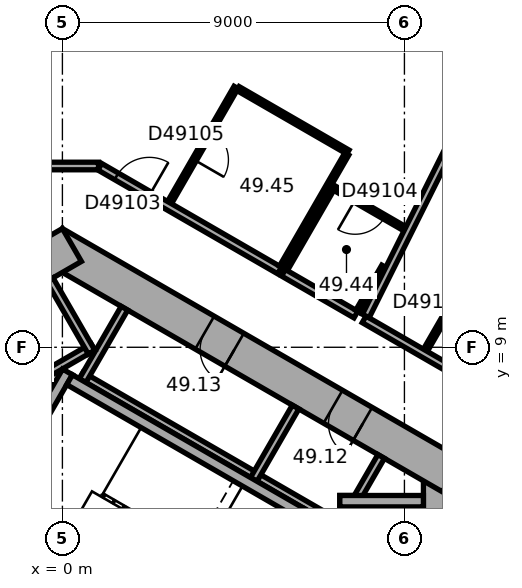
"""IFC4 building model, lengths in metres.
Left out: names, types, materials, properties, quantities, classifications, styles, units other than length and angle.
Written with IfcOpenShell. Run it as: python <this file> out.ifc"""

import sys

from ifc_helpers import new_model, si_unit, direction, frame, frame_2d, origin, place, context, subcontext, project, spatial, rectangle, extrude, element, fill, save


model = new_model("IFC4")
c1 = context("Model", 3, precision=1e-05, world=origin(), true_north=direction((0.0, 1.0)))
c2 = subcontext(c1, "Body", "Model", "MODEL_VIEW")
j1 = project(units=[si_unit("LENGTHUNIT", "METRE"), si_unit("PLANEANGLEUNIT", "RADIAN")], contexts=[c1])
p1 = place(None, origin())
s1 = spatial("IfcSite", under=j1, at=p1, CompositionType="ELEMENT")
p2 = place(p1, origin())
s2 = spatial("IfcBuilding", under=s1, at=p2, CompositionType="ELEMENT")
p3 = place(p2, frame((0.0, 0.0, 198.4)))
s3 = spatial("IfcBuildingStorey", under=s2, at=p3, CompositionType="ELEMENT", Elevation=198.4)
p4 = place(p3, frame((10.0, -6.062, 0.0), z_axis=(0.0, 0.0, 1.0), x_axis=(0.0, 1.0, 0.0)))
e1 = element("IfcWall", 1, at=p4, inside=s3, PredefinedType="SHEAR", context=c2, shape_type="SweptSolid", body=[
    extrude(rectangle(XDim=12.125, YDim=1.0, at=frame_2d((6.062, 0.0))), origin(), (0.0, 0.0, 1.0), 3.7),
])
p5 = place(p4, frame((6.262, 0.0, 0.0)))
e2 = element("IfcOpeningElement", 2, at=p5, cuts=e1, PredefinedType="OPENING", context=c2, shape_type="SweptSolid", body=[
    extrude(rectangle(XDim=1.5, YDim=2.1, at=frame_2d((0.75, 1.05))), frame((0.0, 0.51, 0.0), z_axis=(0.0, -1.0, 0.0), x_axis=(1.0, 0.0, 0.0)), (0.0, 0.0, 1.0), 1.02),
])
p6 = place(p4, frame((1.812, 0.0, 0.0)))
e3 = element("IfcOpeningElement", 3, at=p6, cuts=e1, PredefinedType="OPENING", context=c2, shape_type="SweptSolid", body=[
    extrude(rectangle(XDim=0.9, YDim=2.1, at=frame_2d((0.45, 1.05))), frame((0.0, 0.51, 0.0), z_axis=(0.0, -1.0, 0.0), x_axis=(1.0, 0.0, 0.0)), (0.0, 0.0, 1.0), 1.02),
])
p7 = place(p4, frame((4.412, 0.0, 0.0)))
e4 = element("IfcOpeningElement", 4, at=p7, cuts=e1, PredefinedType="OPENING", context=c2, shape_type="SweptSolid", body=[
    extrude(rectangle(XDim=0.9, YDim=2.1, at=frame_2d((0.45, 1.05))), frame((0.0, 0.51, 0.0), z_axis=(0.0, -1.0, 0.0), x_axis=(1.0, 0.0, 0.0)), (0.0, 0.0, 1.0), 1.02),
])
p8 = place(p3, frame((10.25, 5.629, 0.0), z_axis=(0.0, 0.0, 1.0), x_axis=(-0.866022616891, 0.50000482701, 0.0)))
e5 = element("IfcWall", 5, at=p8, inside=s3, PredefinedType="SHEAR", context=c2, shape_type="SweptSolid", body=[
    extrude(rectangle(XDim=12.125, YDim=1.0, at=frame_2d((6.062, 0.0))), origin(), (0.0, 0.0, 1.0), 3.7),
])
p9 = place(p8, frame((2.712, 0.0, 0.0)))
e6 = element("IfcOpeningElement", 6, at=p9, cuts=e5, PredefinedType="OPENING", context=c2, shape_type="SweptSolid", body=[
    extrude(rectangle(XDim=0.9, YDim=2.1, at=frame_2d((0.45, 1.05))), frame((0.0, 0.51, 0.0), z_axis=(0.0, -1.0, 0.0), x_axis=(1.0, 0.0, 0.0)), (0.0, 0.0, 1.0), 1.02),
])
p10 = place(p8, frame((6.612, 0.0, 0.0)))
e7 = element("IfcOpeningElement", 7, at=p10, cuts=e5, PredefinedType="OPENING", context=c2, shape_type="SweptSolid", body=[
    extrude(rectangle(XDim=0.9, YDim=2.1, at=frame_2d((0.45, 1.05))), frame((0.0, 0.51, 0.0), z_axis=(0.0, -1.0, 0.0), x_axis=(1.0, 0.0, 0.0)), (0.0, 0.0, 1.0), 1.02),
])
p11 = place(p3, frame((0.25, 11.691, 0.0), z_axis=(0.0, 0.0, 1.0), x_axis=(-0.866022616891, -0.50000482701, 0.0)))
e8 = element("IfcWall", 8, at=p11, inside=s3, PredefinedType="SHEAR", context=c2, shape_type="SweptSolid", body=[
    extrude(rectangle(XDim=12.125, YDim=1.0, at=frame_2d((6.062, 0.0))), origin(), (0.0, 0.0, 1.0), 3.7),
])
p12 = place(p11, frame((6.262, 0.0, 0.0)))
e9 = element("IfcOpeningElement", 9, at=p12, cuts=e8, PredefinedType="OPENING", context=c2, shape_type="SweptSolid", body=[
    extrude(rectangle(XDim=1.5, YDim=2.1, at=frame_2d((0.75, 1.05))), frame((0.0, 0.51, 0.0), z_axis=(0.0, -1.0, 0.0), x_axis=(1.0, 0.0, 0.0)), (0.0, 0.0, 1.0), 1.02),
])
p13 = place(p11, frame((1.812, 0.0, 0.0)))
e10 = element("IfcOpeningElement", 10, at=p13, cuts=e8, PredefinedType="OPENING", context=c2, shape_type="SweptSolid", body=[
    extrude(rectangle(XDim=0.9, YDim=2.1, at=frame_2d((0.45, 1.05))), frame((0.0, 0.51, 0.0), z_axis=(0.0, -1.0, 0.0), x_axis=(1.0, 0.0, 0.0)), (0.0, 0.0, 1.0), 1.02),
])
p14 = place(p11, frame((4.412, 0.0, 0.0)))
e11 = element("IfcOpeningElement", 11, at=p14, cuts=e8, PredefinedType="OPENING", context=c2, shape_type="SweptSolid", body=[
    extrude(rectangle(XDim=0.9, YDim=2.1, at=frame_2d((0.45, 1.05))), frame((0.0, 0.51, 0.0), z_axis=(0.0, -1.0, 0.0), x_axis=(1.0, 0.0, 0.0)), (0.0, 0.0, 1.0), 1.02),
])
p15 = place(p3, frame((19.464, 14.599, 0.0), z_axis=(0.0, 0.0, 1.0), x_axis=(-0.894935755043, 0.446195018289, 0.0)))
e12 = element("IfcWall", 12, at=p15, inside=s3, PredefinedType="STANDARD", context=c2, shape_type="SweptSolid", body=[
    extrude(rectangle(XDim=20.044, YDim=0.2, at=frame_2d((10.022, 0.0))), origin(), (0.0, 0.0, 1.0), 3.7),
])
p16 = place(p15, frame((1.313, 0.0, 0.9)))
e13 = element("IfcOpeningElement", 13, at=p16, cuts=e12, PredefinedType="OPENING", context=c2, shape_type="SweptSolid", body=[
    extrude(rectangle(XDim=2.4, YDim=2.0, at=frame_2d((1.2, 1.0))), frame((0.0, 0.11, 0.0), z_axis=(0.0, -1.0, 0.0), x_axis=(1.0, 0.0, 0.0)), (0.0, 0.0, 1.0), 0.22),
])
p17 = place(p15, frame((5.067, 0.0, 0.9)))
e14 = element("IfcOpeningElement", 14, at=p17, cuts=e12, PredefinedType="OPENING", context=c2, shape_type="SweptSolid", body=[
    extrude(rectangle(XDim=2.4, YDim=2.0, at=frame_2d((1.2, 1.0))), frame((0.0, 0.11, 0.0), z_axis=(0.0, -1.0, 0.0), x_axis=(1.0, 0.0, 0.0)), (0.0, 0.0, 1.0), 0.22),
])
p18 = place(p15, frame((8.821, 0.0, 0.9)))
e15 = element("IfcOpeningElement", 15, at=p18, cuts=e12, PredefinedType="OPENING", context=c2, shape_type="SweptSolid", body=[
    extrude(rectangle(XDim=2.4, YDim=2.0, at=frame_2d((1.2, 1.0))), frame((0.0, 0.11, 0.0), z_axis=(0.0, -1.0, 0.0), x_axis=(1.0, 0.0, 0.0)), (0.0, 0.0, 1.0), 0.22),
])
p19 = place(p15, frame((12.575, 0.0, 0.9)))
e16 = element("IfcOpeningElement", 16, at=p19, cuts=e12, PredefinedType="OPENING", context=c2, shape_type="SweptSolid", body=[
    extrude(rectangle(XDim=2.4, YDim=2.0, at=frame_2d((1.2, 1.0))), frame((0.0, 0.11, 0.0), z_axis=(0.0, -1.0, 0.0), x_axis=(1.0, 0.0, 0.0)), (0.0, 0.0, 1.0), 0.22),
])
p20 = place(p15, frame((16.329, 0.0, 0.9)))
e17 = element("IfcOpeningElement", 17, at=p20, cuts=e12, PredefinedType="OPENING", context=c2, shape_type="SweptSolid", body=[
    extrude(rectangle(XDim=2.4, YDim=2.0, at=frame_2d((1.2, 1.0))), frame((0.0, 0.11, 0.0), z_axis=(0.0, -1.0, 0.0), x_axis=(1.0, 0.0, 0.0)), (0.0, 0.0, 1.0), 0.22),
])
p21 = place(p3, frame((7.424, 4.259, 0.0), z_axis=(0.0, 0.0, 1.0), x_axis=(-0.866026010844, 0.49999894854, 0.0)))
e18 = element("IfcWall", 18, at=p21, inside=s3, PredefinedType="PARTITIONING", context=c2, shape_type="SweptSolid", body=[
    extrude(rectangle(XDim=8.0, YDim=0.2, at=frame_2d((4.0, 0.0))), origin(), (0.0, 0.0, 1.0), 3.42),
])
for number, where, z_axis, x_axis in (
    (19, (7.287, 4.222, 0.0), (0.0, 0.0, 1.0), (0.5, 0.866, 0.0)),
    (20, (5.036, 5.522, 0.0), (0.0, 0.0, 1.0), (0.5, 0.866, 0.0)),
    (21, (0.532, 8.122, 0.0), (0.0, 0.0, 1.0), (0.5, 0.866, 0.0)),
):
    element("IfcWall", number, at=place(p3, frame(where, z_axis=z_axis, x_axis=x_axis)), inside=s3, PredefinedType="PARTITIONING", context=c2, shape_type="SweptSolid", body=[
        extrude(rectangle(XDim=2.2, YDim=0.2, at=frame_2d((1.1, 0.0))), origin(), (0.0, 0.0, 1.0), 3.42),
    ])
p22 = place(p3, frame((0.803, 9.009, 0.0), z_axis=(0.0, 0.0, 1.0), x_axis=(-0.866028230842, -0.499995103361, 0.0)))
e22 = element("IfcWall", 22, at=p22, inside=s3, PredefinedType="PARTITIONING", context=c2, shape_type="SweptSolid", body=[
    extrude(rectangle(XDim=5.4, YDim=0.2, at=frame_2d((2.7, 0.0))), origin(), (0.0, 0.0, 1.0), 3.42),
])
p23 = place(p3, frame((0.767, 8.872, 0.0), z_axis=(0.0, 0.0, 1.0), x_axis=(-0.499994660107, 0.866028486751, 0.0)))
e23 = element("IfcWall", 23, at=p23, inside=s3, PredefinedType="PARTITIONING", context=c2, shape_type="SweptSolid", body=[
    extrude(rectangle(XDim=2.2, YDim=0.2, at=frame_2d((1.1, 0.0))), origin(), (0.0, 0.0, 1.0), 3.42),
])
p24 = place(p3, frame((4.158, 0.602, 0.0), z_axis=(0.0, 0.0, 1.0), x_axis=(0.499977259774, 0.866038532462, 0.0)))
e24 = element("IfcWall", 24, at=p24, inside=s3, PredefinedType="SHEAR", context=c2, shape_type="SweptSolid", body=[
    extrude(rectangle(XDim=4.7, YDim=0.3, at=frame_2d((2.35, 0.0))), origin(), (0.0, 0.0, 1.0), 3.42),
])
p25 = place(p24, frame((0.8, 0.0, 0.0)))
e25 = element("IfcOpeningElement", 25, at=p25, cuts=e24, PredefinedType="OPENING", context=c2, shape_type="SweptSolid", body=[
    extrude(rectangle(XDim=1.2, YDim=2.1, at=frame_2d((0.6, 1.05))), frame((0.0, 0.16, 0.0), z_axis=(0.0, -1.0, 0.0), x_axis=(1.0, 0.0, 0.0)), (0.0, 0.0, 1.0), 0.32),
])
p26 = place(p3, frame((-2.216, 4.282, 0.0), z_axis=(0.0, 0.0, 1.0), x_axis=(0.499977259774, 0.866038532462, 0.0)))
e26 = element("IfcWall", 26, at=p26, inside=s3, PredefinedType="SHEAR", context=c2, shape_type="SweptSolid", body=[
    extrude(rectangle(XDim=4.7, YDim=0.3, at=frame_2d((2.35, 0.0))), origin(), (0.0, 0.0, 1.0), 3.42),
])
p27 = place(p3, frame((6.303, 4.617, 0.0), z_axis=(0.0, 0.0, 1.0), x_axis=(-0.866027801685, 0.499995846692, 0.0)))
e27 = element("IfcWall", 27, at=p27, inside=s3, PredefinedType="SHEAR", context=c2, shape_type="SweptSolid", body=[
    extrude(rectangle(XDim=7.06, YDim=0.3, at=frame_2d((3.53, 0.0))), origin(), (0.0, 0.0, 1.0), 3.42),
])
p28 = place(p3, frame((7.45, 1.75, 0.0), z_axis=(0.0, 0.0, 1.0), x_axis=(0.0, 1.0, 0.0)))
e28 = element("IfcWall", 28, at=p28, inside=s3, PredefinedType="SHEAR", context=c2, shape_type="SweptSolid", body=[
    extrude(rectangle(XDim=3.35, YDim=0.3, at=frame_2d((1.675, 0.0))), origin(), (0.0, 0.0, 1.0), 3.42),
])
p29 = place(p3, frame((7.3, 4.95, 0.0), z_axis=(0.0, 0.0, 1.0), x_axis=(1.0, 0.0, 0.0)))
e29 = element("IfcWall", 29, at=p29, inside=s3, PredefinedType="SHEAR", context=c2, shape_type="SweptSolid", body=[
    extrude(rectangle(XDim=2.2, YDim=0.3, at=frame_2d((1.1, 0.0))), origin(), (0.0, 0.0, 1.0), 3.42),
])
p30 = place(p3, frame((0.95, 13.77, 0.0), z_axis=(0.0, 0.0, 1.0), x_axis=(-1.0, 0.0, 0.0)))
e30 = element("IfcWall", 30, at=p30, inside=s3, PredefinedType="PARTITIONING", context=c2, shape_type="SweptSolid", body=[
    extrude(rectangle(XDim=1.86, YDim=0.2, at=frame_2d((0.93, 0.0))), origin(), (0.0, 0.0, 1.0), 3.42),
])
p31 = place(p3, frame((2.819, 12.806, 0.0), z_axis=(0.0, 0.0, 1.0), x_axis=(0.500010275428, 0.866019471182, 0.0)))
e31 = element("IfcWall", 31, at=p31, inside=s3, PredefinedType="PARTITIONING", context=c2, shape_type="SweptSolid", body=[
    extrude(rectangle(XDim=3.5, YDim=0.12, at=frame_2d((1.75, 0.0))), origin(), (0.0, 0.0, 1.0), 3.42),
])
p32 = place(p31, frame((1.3, 0.0, 0.0)))
e32 = element("IfcOpeningElement", 32, at=p32, cuts=e31, PredefinedType="OPENING", context=c2, shape_type="SweptSolid", body=[
    extrude(rectangle(XDim=0.9, YDim=2.1, at=frame_2d((0.45, 1.05))), frame((0.0, 0.07, 0.0), z_axis=(0.0, -1.0, 0.0), x_axis=(1.0, 0.0, 0.0)), (0.0, 0.0, 1.0), 0.14),
])
p33 = place(p3, frame((4.621, 15.807, 0.0), z_axis=(0.0, 0.0, 1.0), x_axis=(0.866039519639, -0.499975549825, 0.0)))
e33 = element("IfcWall", 33, at=p33, inside=s3, PredefinedType="PARTITIONING", context=c2, shape_type="SweptSolid", body=[
    extrude(rectangle(XDim=3.34, YDim=0.12, at=frame_2d((1.67, 0.0))), origin(), (0.0, 0.0, 1.0), 3.42),
])
p34 = place(p3, frame((5.713, 11.02, 0.0), z_axis=(0.0, 0.0, 1.0), x_axis=(-0.866038905227, 0.499976614087, 0.0)))
e34 = element("IfcWall", 34, at=p34, inside=s3, PredefinedType="PARTITIONING", context=c2, shape_type="SweptSolid", body=[
    extrude(rectangle(XDim=5.46, YDim=0.2, at=frame_2d((2.73, 0.0))), origin(), (0.0, 0.0, 1.0), 3.42),
])
p35 = place(p34, frame((3.955, 0.0, 0.0)))
e35 = element("IfcOpeningElement", 35, at=p35, cuts=e34, PredefinedType="OPENING", context=c2, shape_type="SweptSolid", body=[
    extrude(rectangle(XDim=1.0, YDim=2.1, at=frame_2d((0.5, 1.05))), frame((0.0, 0.11, 0.0), z_axis=(0.0, -1.0, 0.0), x_axis=(1.0, 0.0, 0.0)), (0.0, 0.0, 1.0), 0.22),
])
p36 = place(p3, frame((5.867, 11.046, 0.0), z_axis=(0.0, 0.0, 1.0), x_axis=(0.500004234368, 0.866022959057, 0.0)))
e36 = element("IfcWall", 36, at=p36, inside=s3, PredefinedType="PARTITIONING", context=c2, shape_type="SweptSolid", body=[
    extrude(rectangle(XDim=2.5, YDim=0.12, at=frame_2d((1.25, 0.0))), origin(), (0.0, 0.0, 1.0), 3.42),
])
p37 = place(p3, frame((7.169, 13.181, 0.0), z_axis=(0.0, 0.0, 1.0), x_axis=(0.866048165231, -0.499960573946, 0.0)))
e37 = element("IfcWall", 37, at=p37, inside=s3, PredefinedType="PARTITIONING", context=c2, shape_type="SweptSolid", body=[
    extrude(rectangle(XDim=2.13, YDim=0.12, at=frame_2d((1.065, 0.0))), origin(), (0.0, 0.0, 1.0), 3.42),
])
p38 = place(p37, frame((0.615, 0.0, 0.0)))
e38 = element("IfcOpeningElement", 38, at=p38, cuts=e37, PredefinedType="OPENING", context=c2, shape_type="SweptSolid", body=[
    extrude(rectangle(XDim=0.9, YDim=2.1, at=frame_2d((0.45, 1.05))), frame((0.0, 0.07, 0.0), z_axis=(0.0, -1.0, 0.0), x_axis=(1.0, 0.0, 0.0)), (0.0, 0.0, 1.0), 0.14),
])
p39 = place(p3, frame((7.483, 14.085, 0.0), z_axis=(0.0, 0.0, 1.0), x_axis=(-0.499978425106, -0.866037859697, 0.0)))
e39 = element("IfcWall", 39, at=p39, inside=s3, PredefinedType="PARTITIONING", context=c2, shape_type="SweptSolid", body=[
    extrude(rectangle(XDim=3.44, YDim=0.12, at=frame_2d((1.72, 0.0))), origin(), (0.0, 0.0, 1.0), 3.42),
])
p40 = place(p3, frame((7.722, 9.86, 0.0), z_axis=(0.0, 0.0, 1.0), x_axis=(-0.86598042715, 0.500077893725, 0.0)))
e40 = element("IfcWall", 40, at=p40, inside=s3, PredefinedType="PARTITIONING", context=c2, shape_type="SweptSolid", body=[
    extrude(rectangle(XDim=2.2, YDim=0.2, at=frame_2d((1.1, 0.0))), origin(), (0.0, 0.0, 1.0), 3.42),
])
p41 = place(p3, frame((8.457, 11.132, 0.0), z_axis=(0.0, 0.0, 1.0), x_axis=(-0.500129009956, -0.865950907038, 0.0)))
e41 = element("IfcWall", 41, at=p41, inside=s3, PredefinedType="PARTITIONING", context=c2, shape_type="SweptSolid", body=[
    extrude(rectangle(XDim=1.369, YDim=0.12, at=frame_2d((0.685, 0.0))), origin(), (0.0, 0.0, 1.0), 3.42),
])
p42 = place(p3, frame((9.552, 8.919, 0.0), z_axis=(0.0, 0.0, 1.0), x_axis=(0.499952165731, 0.866053019151, 0.0)))
e42 = element("IfcWall", 42, at=p42, inside=s3, PredefinedType="PARTITIONING", context=c2, shape_type="SweptSolid", body=[
    extrude(rectangle(XDim=2.3, YDim=0.12, at=frame_2d((1.15, 0.0))), origin(), (0.0, 0.0, 1.0), 3.42),
])
p43 = place(p42, frame((0.7, 0.0, 0.0)))
e43 = element("IfcOpeningElement", 43, at=p43, cuts=e42, PredefinedType="OPENING", context=c2, shape_type="SweptSolid", body=[
    extrude(rectangle(XDim=0.9, YDim=2.1, at=frame_2d((0.45, 1.05))), frame((0.0, 0.07, 0.0), z_axis=(0.0, -1.0, 0.0), x_axis=(1.0, 0.0, 0.0)), (0.0, 0.0, 1.0), 0.14),
])
p44 = place(p3, frame((11.233, 7.833, 0.0), z_axis=(0.0, 0.0, 1.0), x_axis=(-0.866002813504, 0.500039125473, 0.0)))
e44 = element("IfcWall", 44, at=p44, inside=s3, PredefinedType="PARTITIONING", context=c2, shape_type="SweptSolid", body=[
    extrude(rectangle(XDim=3.804, YDim=0.2, at=frame_2d((1.902, 0.0))), origin(), (0.0, 0.0, 1.0), 3.42),
])
p45 = place(p3, frame((11.73, 17.338, 0.0), z_axis=(0.0, 0.0, 1.0), x_axis=(-0.446189718314, -0.894938397473, 0.0)))
e45 = element("IfcWall", 45, at=p45, inside=s3, PredefinedType="PARTITIONING", context=c2, shape_type="SweptSolid", body=[
    extrude(rectangle(XDim=8.396, YDim=0.2, at=frame_2d((4.198, 0.0))), origin(), (0.0, 0.0, 1.0), 2.87),
])
p46 = place(p9, origin())
e46 = element("IfcDoor", 46, at=p46, inside=s3, OperationType="SINGLE_SWING_LEFT", PredefinedType="DOOR", context=c2, shape_type="SweptSolid", body=[
    extrude(rectangle(XDim=0.9, YDim=2.1, at=frame_2d((0.45, 1.05))), frame((0.0, 0.025, 0.0), z_axis=(0.0, -1.0, 0.0), x_axis=(1.0, 0.0, 0.0)), (0.0, 0.0, 1.0), 0.05),
])
fill(e6, e46)
p47 = place(p10, origin())
e47 = element("IfcDoor", 47, at=p47, inside=s3, OperationType="SINGLE_SWING_LEFT", PredefinedType="DOOR", context=c2, shape_type="SweptSolid", body=[
    extrude(rectangle(XDim=0.9, YDim=2.1, at=frame_2d((0.45, 1.05))), frame((0.0, 0.025, 0.0), z_axis=(0.0, -1.0, 0.0), x_axis=(1.0, 0.0, 0.0)), (0.0, 0.0, 1.0), 0.05),
])
fill(e7, e47)
p48 = place(p43, origin())
e48 = element("IfcDoor", 48, at=p48, inside=s3, OperationType="SINGLE_SWING_LEFT", PredefinedType="DOOR", context=c2, shape_type="SweptSolid", body=[
    extrude(rectangle(XDim=0.9, YDim=2.1, at=frame_2d((0.45, 1.05))), frame((0.0, 0.025, 0.0), z_axis=(0.0, -1.0, 0.0), x_axis=(1.0, 0.0, 0.0)), (0.0, 0.0, 1.0), 0.05),
])
fill(e43, e48)
p49 = place(p35, origin())
e49 = element("IfcDoor", 49, at=p49, inside=s3, OperationType="SINGLE_SWING_LEFT", PredefinedType="DOOR", context=c2, shape_type="SweptSolid", body=[
    extrude(rectangle(XDim=1.0, YDim=2.1, at=frame_2d((0.5, 1.05))), frame((0.0, 0.025, 0.0), z_axis=(0.0, -1.0, 0.0), x_axis=(1.0, 0.0, 0.0)), (0.0, 0.0, 1.0), 0.05),
])
fill(e35, e49)
p50 = place(p38, origin())
e50 = element("IfcDoor", 50, at=p50, inside=s3, OperationType="SINGLE_SWING_LEFT", PredefinedType="DOOR", context=c2, shape_type="SweptSolid", body=[
    extrude(rectangle(XDim=0.9, YDim=2.1, at=frame_2d((0.45, 1.05))), frame((0.0, 0.025, 0.0), z_axis=(0.0, -1.0, 0.0), x_axis=(1.0, 0.0, 0.0)), (0.0, 0.0, 1.0), 0.05),
])
fill(e38, e50)
p51 = place(p32, origin())
e51 = element("IfcDoor", 51, at=p51, inside=s3, OperationType="SINGLE_SWING_LEFT", PredefinedType="DOOR", context=c2, shape_type="SweptSolid", body=[
    extrude(rectangle(XDim=0.9, YDim=2.1, at=frame_2d((0.45, 1.05))), frame((0.0, 0.025, 0.0), z_axis=(0.0, -1.0, 0.0), x_axis=(1.0, 0.0, 0.0)), (0.0, 0.0, 1.0), 0.05),
])
fill(e32, e51)
save(model, sys.argv[1])
